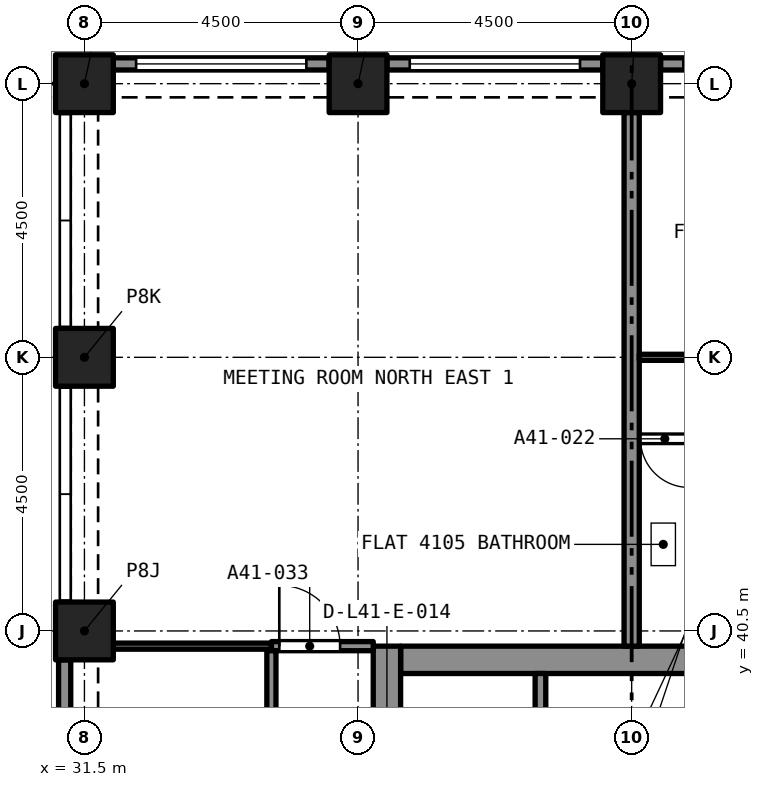
"""IFC4 building model, lengths in metres.
Left out: names, types, materials, properties, quantities, classifications, styles, units other than length and angle.
Written with IfcOpenShell. Run it as: python <this file> out.ifc"""

import sys

from ifc_helpers import new_model, si_unit, direction, frame, frame_2d, origin, origin_2d, place, context, subcontext, project, spatial, rectangle, extrude, element, fill, save


model = new_model("IFC4")
c1 = context("Model", 3, precision=1e-05, world=origin(), true_north=direction((0.0, 1.0)))
c2 = subcontext(c1, "Body", "Model", "MODEL_VIEW")
j1 = project(units=[si_unit("LENGTHUNIT", "METRE"), si_unit("PLANEANGLEUNIT", "RADIAN")], contexts=[c1])
p1 = place(None, origin())
s1 = spatial("IfcSite", under=j1, at=p1, CompositionType="ELEMENT")
p2 = place(p1, origin())
s2 = spatial("IfcBuilding", under=s1, at=p2, CompositionType="ELEMENT")
p3 = place(p2, frame((0.0, 0.0, 146.2)))
s3 = spatial("IfcBuildingStorey", under=s2, at=p3, CompositionType="ELEMENT", Elevation=146.2)
for number, where, z_axis, x_axis in (
    (1, (31.5, 40.5, 0.0), (0.0, 0.0, 1.0), (1.0, 0.0, 0.0)),
    (2, (31.5, 45.0, 0.0), (0.0, 0.0, 1.0), (1.0, 0.0, 0.0)),
    (3, (31.5, 49.5, 0.0), (0.0, 0.0, 1.0), (1.0, 0.0, 0.0)),
    (4, (36.0, 49.5, 0.0), (0.0, 0.0, 1.0), (1.0, 0.0, 0.0)),
    (5, (40.5, 49.5, 0.0), (0.0, 0.0, 1.0), (1.0, 0.0, 0.0)),
):
    element("IfcColumn", number, at=place(p3, frame(where, z_axis=z_axis, x_axis=x_axis)), inside=s3, PredefinedType="COLUMN", context=c2, shape_type="SweptSolid", body=[
        extrude(rectangle(XDim=0.95, YDim=0.95, at=origin_2d()), origin(), (0.0, 0.0, 1.0), 4.4),
    ])
p4 = place(p3, frame((36.7, 40.025, 0.0), z_axis=(0.0, 0.0, 1.0), x_axis=(1.0, 0.0, 0.0)))
e6 = element("IfcWall", 6, at=p4, inside=s3, PredefinedType="SOLIDWALL", context=c2, shape_type="SweptSolid", body=[
    extrude(rectangle(XDim=7.6, YDim=0.45, at=frame_2d((3.8, 0.0))), origin(), (0.0, 0.0, 1.0), 4.4),
])
p5 = place(p3, frame((36.475, 27.25, 0.0), z_axis=(0.0, 0.0, 1.0), x_axis=(0.0, 1.0, 0.0)))
e7 = element("IfcWall", 7, at=p5, inside=s3, PredefinedType="SOLIDWALL", context=c2, shape_type="SweptSolid", body=[
    extrude(rectangle(XDim=13.0, YDim=0.45, at=frame_2d((6.5, 0.0))), origin(), (0.0, 0.0, 1.0), 4.4),
])
p6 = place(p5, frame((8.7, 0.0, 0.0)))
e8 = element("IfcOpeningElement", 8, at=p6, cuts=e7, PredefinedType="OPENING", context=c2, shape_type="SweptSolid", body=[
    extrude(rectangle(XDim=1.2, YDim=2.1, at=frame_2d((0.6, 1.05))), frame((0.0, 0.235, 0.0), z_axis=(0.0, -1.0, 0.0), x_axis=(1.0, 0.0, 0.0)), (0.0, 0.0, 1.0), 0.47),
])
p7 = place(p3, frame((40.975, 49.825, 0.0), z_axis=(0.0, 0.0, 1.0), x_axis=(1.0, 0.0, 0.0)))
e9 = element("IfcWall", 9, at=p7, inside=s3, PredefinedType="SOLIDWALL", context=c2, shape_type="SweptSolid", body=[
    extrude(rectangle(XDim=3.55, YDim=0.2, at=frame_2d((1.775, 0.0))), origin(), (0.0, 0.0, 1.0), 4.4),
])
p8 = place(p7, frame((0.375, 0.0, 0.45)))
e10 = element("IfcOpeningElement", 10, at=p8, cuts=e9, PredefinedType="OPENING", context=c2, shape_type="SweptSolid", body=[
    extrude(rectangle(XDim=2.8, YDim=2.55, at=frame_2d((1.4, 1.275))), frame((0.0, 0.11, 0.0), z_axis=(0.0, -1.0, 0.0), x_axis=(1.0, 0.0, 0.0)), (0.0, 0.0, 1.0), 0.22),
])
p9 = place(p3, frame((36.475, 49.825, 0.0), z_axis=(0.0, 0.0, 1.0), x_axis=(1.0, 0.0, 0.0)))
e11 = element("IfcWall", 11, at=p9, inside=s3, PredefinedType="SOLIDWALL", context=c2, shape_type="SweptSolid", body=[
    extrude(rectangle(XDim=3.55, YDim=0.2, at=frame_2d((1.775, 0.0))), origin(), (0.0, 0.0, 1.0), 4.4),
])
p10 = place(p9, frame((0.375, 0.0, 0.45)))
e12 = element("IfcOpeningElement", 12, at=p10, cuts=e11, PredefinedType="OPENING", context=c2, shape_type="SweptSolid", body=[
    extrude(rectangle(XDim=2.8, YDim=2.55, at=frame_2d((1.4, 1.275))), frame((0.0, 0.11, 0.0), z_axis=(0.0, -1.0, 0.0), x_axis=(1.0, 0.0, 0.0)), (0.0, 0.0, 1.0), 0.22),
])
p11 = place(p3, frame((31.975, 49.825, 0.0), z_axis=(0.0, 0.0, 1.0), x_axis=(1.0, 0.0, 0.0)))
e13 = element("IfcWall", 13, at=p11, inside=s3, PredefinedType="SOLIDWALL", context=c2, shape_type="SweptSolid", body=[
    extrude(rectangle(XDim=3.55, YDim=0.2, at=frame_2d((1.775, 0.0))), origin(), (0.0, 0.0, 1.0), 4.4),
])
p12 = place(p11, frame((0.375, 0.0, 0.45)))
e14 = element("IfcOpeningElement", 14, at=p12, cuts=e13, PredefinedType="OPENING", context=c2, shape_type="SweptSolid", body=[
    extrude(rectangle(XDim=2.8, YDim=2.55, at=frame_2d((1.4, 1.275))), frame((0.0, 0.11, 0.0), z_axis=(0.0, -1.0, 0.0), x_axis=(1.0, 0.0, 0.0)), (0.0, 0.0, 1.0), 0.22),
])
p13 = place(p3, frame((31.175, 36.475, 0.0), z_axis=(0.0, 0.0, 1.0), x_axis=(0.0, 1.0, 0.0)))
e15 = element("IfcWall", 15, at=p13, inside=s3, PredefinedType="SOLIDWALL", context=c2, shape_type="SweptSolid", body=[
    extrude(rectangle(XDim=3.55, YDim=0.2, at=frame_2d((1.775, 0.0))), origin(), (0.0, 0.0, 1.0), 4.4),
])
p14 = place(p13, frame((0.875, 0.0, 0.0)))
e16 = element("IfcOpeningElement", 16, at=p14, cuts=e15, PredefinedType="OPENING", context=c2, shape_type="SweptSolid", body=[
    extrude(rectangle(XDim=1.8, YDim=2.4, at=frame_2d((0.9, 1.2))), frame((0.0, 0.11, 0.0), z_axis=(0.0, -1.0, 0.0), x_axis=(1.0, 0.0, 0.0)), (0.0, 0.0, 1.0), 0.22),
])
p15 = place(p3, frame((41.477, 43.66, 0.0), z_axis=(0.0, 0.0, 1.0), x_axis=(-1.0, 0.0, 0.0)))
e17 = element("IfcWall", 17, at=p15, inside=s3, PredefinedType="PARTITIONING", context=c2, shape_type="SweptSolid", body=[
    extrude(rectangle(XDim=0.852, YDim=0.125, at=frame_2d((0.426, 0.0))), origin(), (0.0, 0.0, 1.0), 4.1),
])
p16 = place(p15, frame((0.032, 0.0, 0.0)))
e18 = element("IfcOpeningElement", 18, at=p16, cuts=e17, PredefinedType="OPENING", context=c2, shape_type="SweptSolid", body=[
    extrude(rectangle(XDim=0.8, YDim=2.1, at=frame_2d((0.4, 1.05))), frame((0.0, 0.073, 0.0), z_axis=(0.0, -1.0, 0.0), x_axis=(1.0, 0.0, 0.0)), (0.0, 0.0, 1.0), 0.145),
])
p17 = place(p3, frame((40.5, 40.25, 0.0), z_axis=(0.0, 0.0, 1.0), x_axis=(0.0, 1.0, 0.0)))
e19 = element("IfcWall", 19, at=p17, inside=s3, PredefinedType="PARTITIONING", context=c2, shape_type="SweptSolid", body=[
    extrude(rectangle(XDim=8.775, YDim=0.25, at=frame_2d((4.387, 0.0))), origin(), (0.0, 0.0, 1.0), 4.1),
])
p18 = place(p3, frame((40.625, 45.0, 0.0), z_axis=(0.0, 0.0, 1.0), x_axis=(1.0, 0.0, 0.0)))
e20 = element("IfcWall", 20, at=p18, inside=s3, PredefinedType="PARTITIONING", context=c2, shape_type="SweptSolid", body=[
    extrude(rectangle(XDim=4.375, YDim=0.1, at=frame_2d((2.188, 0.0))), origin(), (0.0, 0.0, 1.0), 4.1),
])
p19 = place(p18, frame((1.675, 0.0, 0.0)))
e21 = element("IfcOpeningElement", 21, at=p19, cuts=e20, PredefinedType="OPENING", context=c2, shape_type="SweptSolid", body=[
    extrude(rectangle(XDim=0.9, YDim=2.1, at=frame_2d((0.45, 1.05))), frame((0.0, 0.06, 0.0), z_axis=(0.0, -1.0, 0.0), x_axis=(1.0, 0.0, 0.0)), (0.0, 0.0, 1.0), 0.12),
])
p20 = place(p3, frame((34.575, 40.25, 0.0), z_axis=(0.0, 0.0, 1.0), x_axis=(1.0, 0.0, 0.0)))
e22 = element("IfcWall", 22, at=p20, inside=s3, PredefinedType="PARTITIONING", context=c2, shape_type="SweptSolid", body=[
    extrude(rectangle(XDim=1.675, YDim=0.15, at=frame_2d((0.837, 0.0))), origin(), (0.0, 0.0, 1.0), 4.1),
])
p21 = place(p20, frame((0.13, 0.0, 0.0)))
e23 = element("IfcOpeningElement", 23, at=p21, cuts=e22, PredefinedType="OPENING", context=c2, shape_type="SweptSolid", body=[
    extrude(rectangle(XDim=1.0, YDim=2.1, at=frame_2d((0.5, 1.05))), frame((0.0, 0.085, 0.0), z_axis=(0.0, -1.0, 0.0), x_axis=(1.0, 0.0, 0.0)), (0.0, 0.0, 1.0), 0.17),
])
p22 = place(p3, frame((31.975, 40.25, 0.0), z_axis=(0.0, 0.0, 1.0), x_axis=(1.0, 0.0, 0.0)))
e24 = element("IfcWall", 24, at=p22, inside=s3, PredefinedType="PARTITIONING", context=c2, shape_type="SweptSolid", body=[
    extrude(rectangle(XDim=2.6, YDim=0.1, at=frame_2d((1.3, 0.0))), origin(), (0.0, 0.0, 1.0), 4.1),
])
p23 = place(p3, frame((34.575, 31.5, 0.0), z_axis=(0.0, 0.0, 1.0), x_axis=(0.0, 1.0, 0.0)))
e25 = element("IfcWall", 25, at=p23, inside=s3, PredefinedType="PARTITIONING", context=c2, shape_type="SweptSolid", body=[
    extrude(rectangle(XDim=8.675, YDim=0.15, at=frame_2d((4.337, 0.0))), origin(), (0.0, 0.0, 1.0), 4.1),
])
p24 = place(p23, frame((3.875, 0.0, 0.0)))
e26 = element("IfcOpeningElement", 26, at=p24, cuts=e25, PredefinedType="OPENING", context=c2, shape_type="SweptSolid", body=[
    extrude(rectangle(XDim=1.0, YDim=2.1, at=frame_2d((0.5, 1.05))), frame((0.0, 0.085, 0.0), z_axis=(0.0, -1.0, 0.0), x_axis=(1.0, 0.0, 0.0)), (0.0, 0.0, 1.0), 0.17),
])
p25 = place(p3, frame((39.0, 37.5, 0.0), z_axis=(0.0, 0.0, 1.0), x_axis=(0.0, 1.0, 0.0)))
e27 = element("IfcWall", 27, at=p25, inside=s3, PredefinedType="SOLIDWALL", context=c2, shape_type="SweptSolid", body=[
    extrude(rectangle(XDim=2.3, YDim=0.175, at=frame_2d((1.15, 0.0))), origin(), (0.0, 0.0, 1.0), 4.1),
])
p26 = place(p8, origin())
e28 = element("IfcWindow", 28, at=p26, inside=s3, PartitioningType="SINGLE_PANEL", PredefinedType="WINDOW", context=c2, shape_type="SweptSolid", body=[
    extrude(rectangle(XDim=2.8, YDim=2.55, at=frame_2d((1.4, 1.275))), frame((0.0, 0.03, 0.0), z_axis=(0.0, -1.0, 0.0), x_axis=(1.0, 0.0, 0.0)), (0.0, 0.0, 1.0), 0.06),
])
fill(e10, e28)
p27 = place(p10, origin())
e29 = element("IfcWindow", 29, at=p27, inside=s3, PartitioningType="SINGLE_PANEL", PredefinedType="WINDOW", context=c2, shape_type="SweptSolid", body=[
    extrude(rectangle(XDim=2.8, YDim=2.55, at=frame_2d((1.4, 1.275))), frame((0.0, 0.03, 0.0), z_axis=(0.0, -1.0, 0.0), x_axis=(1.0, 0.0, 0.0)), (0.0, 0.0, 1.0), 0.06),
])
fill(e12, e29)
p28 = place(p12, origin())
e30 = element("IfcWindow", 30, at=p28, inside=s3, PartitioningType="SINGLE_PANEL", PredefinedType="WINDOW", context=c2, shape_type="SweptSolid", body=[
    extrude(rectangle(XDim=2.8, YDim=2.55, at=frame_2d((1.4, 1.275))), frame((0.0, 0.03, 0.0), z_axis=(0.0, -1.0, 0.0), x_axis=(1.0, 0.0, 0.0)), (0.0, 0.0, 1.0), 0.06),
])
fill(e14, e30)
p29 = place(p16, origin())
e31 = element("IfcDoor", 31, at=p29, inside=s3, OperationType="SINGLE_SWING_RIGHT", PredefinedType="DOOR", context=c2, shape_type="SweptSolid", body=[
    extrude(rectangle(XDim=0.8, YDim=2.1, at=frame_2d((0.4, 1.05))), frame((0.0, 0.025, 0.0), z_axis=(0.0, -1.0, 0.0), x_axis=(1.0, 0.0, 0.0)), (0.0, 0.0, 1.0), 0.05),
])
fill(e18, e31)
p30 = place(p21, origin())
e32 = element("IfcDoor", 32, at=p30, inside=s3, OperationType="SINGLE_SWING_LEFT", PredefinedType="DOOR", context=c2, shape_type="SweptSolid", body=[
    extrude(rectangle(XDim=1.0, YDim=2.1, at=frame_2d((0.5, 1.05))), frame((0.0, 0.025, 0.0), z_axis=(0.0, -1.0, 0.0), x_axis=(1.0, 0.0, 0.0)), (0.0, 0.0, 1.0), 0.05),
])
fill(e23, e32)
save(model, sys.argv[1])
